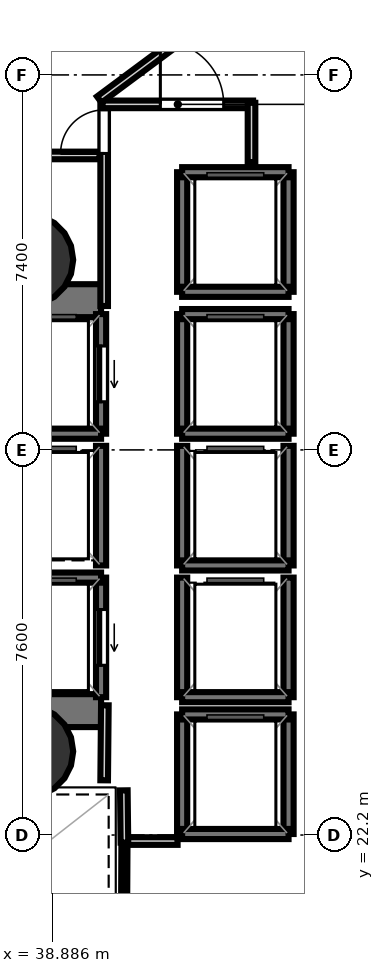
"""IFC4 building model, lengths in metres.
Left out: names, types, materials, properties, quantities, classifications, styles, units other than length and angle.
Written with IfcOpenShell. Run it as: python <this file> out.ifc"""

import sys

from ifc_helpers import new_model, si_unit, direction, frame, frame_2d, origin, origin_2d, place, context, subcontext, project, spatial, rectangle, hollow_circle, extrude, element, fill, save


model = new_model("IFC4")
c1 = context("Model", 3, precision=1e-05, world=origin(), true_north=direction((0.0, 1.0)))
c2 = subcontext(c1, "Body", "Model", "MODEL_VIEW")
j1 = project(units=[si_unit("LENGTHUNIT", "METRE"), si_unit("PLANEANGLEUNIT", "RADIAN")], contexts=[c1])
p1 = place(None, origin())
s1 = spatial("IfcSite", under=j1, at=p1, CompositionType="ELEMENT")
p2 = place(p1, origin())
s2 = spatial("IfcBuilding", under=s1, at=p2, CompositionType="ELEMENT")
p3 = place(p2, frame((0.0, 0.0, 40.5)))
s3 = spatial("IfcBuildingStorey", under=s2, at=p3, CompositionType="ELEMENT", Elevation=40.5)
p4 = place(p3, frame((29.13, 32.745, 0.0), z_axis=(0.0, 0.0, 1.0), x_axis=(1.0, 0.0, 0.0)))
e1 = element("IfcWall", 1, at=p4, inside=s3, PredefinedType="SHEAR", context=c2, shape_type="SweptSolid", body=[
    extrude(rectangle(XDim=10.72, YDim=0.65, at=frame_2d((5.36, 0.0))), origin(), (0.0, 0.0, 1.0), 3.52),
])
p5 = place(p4, frame((1.095, 0.0, 0.0)))
e2 = element("IfcOpeningElement", 2, at=p5, cuts=e1, PredefinedType="OPENING", context=c2, shape_type="SweptSolid", body=[
    extrude(rectangle(XDim=1.25, YDim=2.15, at=frame_2d((0.625, 1.075))), frame((0.0, 0.335, 0.0), z_axis=(0.0, -1.0, 0.0), x_axis=(1.0, 0.0, 0.0)), (0.0, 0.0, 1.0), 0.67),
])
p6 = place(p3, frame((29.13, 24.655, 0.0), z_axis=(0.0, 0.0, 1.0), x_axis=(1.0, 0.0, 0.0)))
e3 = element("IfcWall", 3, at=p6, inside=s3, PredefinedType="SHEAR", context=c2, shape_type="SweptSolid", body=[
    extrude(rectangle(XDim=10.72, YDim=0.65, at=frame_2d((5.36, 0.0))), origin(), (0.0, 0.0, 1.0), 3.52),
])
p7 = place(p6, frame((0.895, 0.0, 0.0)))
e4 = element("IfcOpeningElement", 4, at=p7, cuts=e3, PredefinedType="OPENING", context=c2, shape_type="SweptSolid", body=[
    extrude(rectangle(XDim=1.25, YDim=2.15, at=frame_2d((0.625, 1.075))), frame((0.0, 0.335, 0.0), z_axis=(0.0, -1.0, 0.0), x_axis=(1.0, 0.0, 0.0)), (0.0, 0.0, 1.0), 0.67),
])
for number, where, z_axis, x_axis in (
    (5, (38.4, 33.55, 0.0), (0.0, 0.0, 1.0), (1.0, 0.0, 0.0)),
    (6, (38.4, 23.85, 0.0), (0.0, 0.0, 1.0), (1.0, 0.0, 0.0)),
):
    element("IfcColumn", number, at=place(p3, frame(where, z_axis=z_axis, x_axis=x_axis)), inside=s3, PredefinedType="COLUMN", context=c2, shape_type="SweptSolid", body=[
        extrude(hollow_circle(Radius=0.9, WallThickness=0.045, at=origin_2d()), origin(), (0.0, 0.0, 1.0), 3.7),
    ])
p8 = place(p3, frame((39.85, 30.12, 0.0), z_axis=(0.0, 0.0, 1.0), x_axis=(0.0, 1.0, 0.0)))
e7 = element("IfcWall", 7, at=p8, inside=s3, PredefinedType="SOLIDWALL", context=c2, shape_type="SweptSolid", body=[
    extrude(rectangle(XDim=2.36, YDim=0.2, at=frame_2d((1.18, 0.0))), origin(), (0.0, 0.0, 1.0), 3.52),
])
p9 = place(p8, frame((0.63, 0.0, 0.0)))
e8 = element("IfcOpeningElement", 8, at=p9, cuts=e7, PredefinedType="OPENING", context=c2, shape_type="SweptSolid", body=[
    extrude(rectangle(XDim=1.1, YDim=2.15, at=frame_2d((0.55, 1.075))), frame((0.0, 0.11, 0.0), z_axis=(0.0, -1.0, 0.0), x_axis=(1.0, 0.0, 0.0)), (0.0, 0.0, 1.0), 0.22),
])
p10 = place(p3, frame((37.75, 30.12, 0.0), z_axis=(0.0, 0.0, 1.0), x_axis=(1.0, 0.0, 0.0)))
e9 = element("IfcWall", 9, at=p10, inside=s3, PredefinedType="SOLIDWALL", context=c2, shape_type="SweptSolid", body=[
    extrude(rectangle(XDim=2.1, YDim=0.2, at=frame_2d((1.05, 0.0))), origin(), (0.0, 0.0, 1.0), 3.52),
])
p11 = place(p3, frame((39.85, 24.92, 0.0), z_axis=(0.0, 0.0, 1.0), x_axis=(0.0, 1.0, 0.0)))
e10 = element("IfcWall", 10, at=p11, inside=s3, PredefinedType="SOLIDWALL", context=c2, shape_type="SweptSolid", body=[
    extrude(rectangle(XDim=2.36, YDim=0.2, at=frame_2d((1.18, 0.0))), origin(), (0.0, 0.0, 1.0), 3.52),
])
p12 = place(p11, frame((0.63, 0.0, 0.0)))
e11 = element("IfcOpeningElement", 11, at=p12, cuts=e10, PredefinedType="OPENING", context=c2, shape_type="SweptSolid", body=[
    extrude(rectangle(XDim=1.1, YDim=2.15, at=frame_2d((0.55, 1.075))), frame((0.0, 0.11, 0.0), z_axis=(0.0, -1.0, 0.0), x_axis=(1.0, 0.0, 0.0)), (0.0, 0.0, 1.0), 0.22),
])
p13 = place(p3, frame((37.75, 27.28, 0.0), z_axis=(0.0, 0.0, 1.0), x_axis=(1.0, 0.0, 0.0)))
e12 = element("IfcWall", 12, at=p13, inside=s3, PredefinedType="SOLIDWALL", context=c2, shape_type="SweptSolid", body=[
    extrude(rectangle(XDim=2.1, YDim=0.2, at=frame_2d((1.05, 0.0))), origin(), (0.0, 0.0, 1.0), 3.52),
])
for number, where, z_axis, x_axis in (
    (13, (43.55, 30.12, 0.0), (0.0, 0.0, 1.0), (0.0, 1.0, 0.0)),
    (14, (41.45, 30.12, 0.0), (0.0, 0.0, 1.0), (0.0, 1.0, 0.0)),
):
    element("IfcWall", number, at=place(p3, frame(where, z_axis=z_axis, x_axis=x_axis)), inside=s3, PredefinedType="SOLIDWALL", context=c2, shape_type="SweptSolid", body=[
        extrude(rectangle(XDim=2.36, YDim=0.2, at=frame_2d((1.18, 0.0))), origin(), (0.0, 0.0, 1.0), 3.52),
    ])
for number, where, z_axis, x_axis in (
    (15, (41.45, 32.48, 0.0), (0.0, 0.0, 1.0), (1.0, 0.0, 0.0)),
    (16, (41.45, 30.12, 0.0), (0.0, 0.0, 1.0), (1.0, 0.0, 0.0)),
):
    element("IfcWall", number, at=place(p3, frame(where, z_axis=z_axis, x_axis=x_axis)), inside=s3, PredefinedType="SOLIDWALL", context=c2, shape_type="SweptSolid", body=[
        extrude(rectangle(XDim=2.1, YDim=0.2, at=frame_2d((1.05, 0.0))), origin(), (0.0, 0.0, 1.0), 3.52),
    ])
for number, where, z_axis, x_axis in (
    (17, (43.55, 27.52, 0.0), (0.0, 0.0, 1.0), (0.0, 1.0, 0.0)),
    (18, (41.45, 27.52, 0.0), (0.0, 0.0, 1.0), (0.0, 1.0, 0.0)),
):
    element("IfcWall", number, at=place(p3, frame(where, z_axis=z_axis, x_axis=x_axis)), inside=s3, PredefinedType="SOLIDWALL", context=c2, shape_type="SweptSolid", body=[
        extrude(rectangle(XDim=2.36, YDim=0.2, at=frame_2d((1.18, 0.0))), origin(), (0.0, 0.0, 1.0), 3.52),
    ])
p14 = place(p3, frame((41.45, 27.52, 0.0), z_axis=(0.0, 0.0, 1.0), x_axis=(1.0, 0.0, 0.0)))
e19 = element("IfcWall", 19, at=p14, inside=s3, PredefinedType="SOLIDWALL", context=c2, shape_type="SweptSolid", body=[
    extrude(rectangle(XDim=2.1, YDim=0.2, at=frame_2d((1.05, 0.0))), origin(), (0.0, 0.0, 1.0), 3.52),
])
for number, where, z_axis, x_axis in (
    (20, (43.55, 24.92, 0.0), (0.0, 0.0, 1.0), (0.0, 1.0, 0.0)),
    (21, (41.45, 24.92, 0.0), (0.0, 0.0, 1.0), (0.0, 1.0, 0.0)),
):
    element("IfcWall", number, at=place(p3, frame(where, z_axis=z_axis, x_axis=x_axis)), inside=s3, PredefinedType="SOLIDWALL", context=c2, shape_type="SweptSolid", body=[
        extrude(rectangle(XDim=2.36, YDim=0.2, at=frame_2d((1.18, 0.0))), origin(), (0.0, 0.0, 1.0), 3.52),
    ])
p15 = place(p3, frame((41.45, 24.92, 0.0), z_axis=(0.0, 0.0, 1.0), x_axis=(1.0, 0.0, 0.0)))
e22 = element("IfcWall", 22, at=p15, inside=s3, PredefinedType="SOLIDWALL", context=c2, shape_type="SweptSolid", body=[
    extrude(rectangle(XDim=2.1, YDim=0.2, at=frame_2d((1.05, 0.0))), origin(), (0.0, 0.0, 1.0), 3.52),
])
p16 = place(p3, frame((39.85, 27.52, 0.0), z_axis=(0.0, 0.0, 1.0), x_axis=(0.0, 1.0, 0.0)))
e23 = element("IfcWall", 23, at=p16, inside=s3, PredefinedType="SOLIDWALL", context=c2, shape_type="SweptSolid", body=[
    extrude(rectangle(XDim=2.36, YDim=0.2, at=frame_2d((1.18, 0.0))), origin(), (0.0, 0.0, 1.0), 3.52),
])
for number, where, z_axis, x_axis in (
    (24, (43.55, 22.22, 0.0), (0.0, 0.0, 1.0), (0.0, 1.0, 0.0)),
    (25, (41.45, 22.22, 0.0), (0.0, 0.0, 1.0), (0.0, 1.0, 0.0)),
):
    element("IfcWall", number, at=place(p3, frame(where, z_axis=z_axis, x_axis=x_axis)), inside=s3, PredefinedType="SOLIDWALL", context=c2, shape_type="SweptSolid", body=[
        extrude(rectangle(XDim=2.36, YDim=0.2, at=frame_2d((1.18, 0.0))), origin(), (0.0, 0.0, 1.0), 3.52),
    ])
for number, where, z_axis, x_axis in (
    (26, (41.45, 24.58, 0.0), (0.0, 0.0, 1.0), (1.0, 0.0, 0.0)),
    (27, (41.45, 22.22, 0.0), (0.0, 0.0, 1.0), (1.0, 0.0, 0.0)),
):
    element("IfcWall", number, at=place(p3, frame(where, z_axis=z_axis, x_axis=x_axis)), inside=s3, PredefinedType="SOLIDWALL", context=c2, shape_type="SweptSolid", body=[
        extrude(rectangle(XDim=2.1, YDim=0.2, at=frame_2d((1.05, 0.0))), origin(), (0.0, 0.0, 1.0), 3.52),
    ])
for number, where, z_axis, x_axis in (
    (28, (43.55, 32.92, 0.0), (0.0, 0.0, 1.0), (0.0, 1.0, 0.0)),
    (29, (41.45, 32.92, 0.0), (0.0, 0.0, 1.0), (0.0, 1.0, 0.0)),
):
    element("IfcWall", number, at=place(p3, frame(where, z_axis=z_axis, x_axis=x_axis)), inside=s3, PredefinedType="SOLIDWALL", context=c2, shape_type="SweptSolid", body=[
        extrude(rectangle(XDim=2.36, YDim=0.2, at=frame_2d((1.18, 0.0))), origin(), (0.0, 0.0, 1.0), 3.52),
    ])
for number, where, z_axis, x_axis in (
    (30, (41.45, 35.28, 0.0), (0.0, 0.0, 1.0), (1.0, 0.0, 0.0)),
    (31, (41.45, 32.92, 0.0), (0.0, 0.0, 1.0), (1.0, 0.0, 0.0)),
):
    element("IfcWall", number, at=place(p3, frame(where, z_axis=z_axis, x_axis=x_axis)), inside=s3, PredefinedType="SOLIDWALL", context=c2, shape_type="SweptSolid", body=[
        extrude(rectangle(XDim=2.1, YDim=0.2, at=frame_2d((1.05, 0.0))), origin(), (0.0, 0.0, 1.0), 3.52),
    ])
p17 = place(p3, frame((39.911, 32.64, 0.0), z_axis=(0.0, 0.0, 1.0), x_axis=(0.0, 1.0, 0.0)))
e32 = element("IfcWall", 32, at=p17, inside=s3, PredefinedType="PARTITIONING", context=c2, shape_type="SweptSolid", body=[
    extrude(rectangle(XDim=4.01, YDim=0.15, at=frame_2d((2.005, 0.0))), origin(), (0.0, 0.0, 1.0), 2.84),
])
p18 = place(p17, frame((3.01, 0.0, 0.0)))
e33 = element("IfcOpeningElement", 33, at=p18, cuts=e32, PredefinedType="OPENING", context=c2, shape_type="SweptSolid", body=[
    extrude(rectangle(XDim=0.86, YDim=2.05, at=frame_2d((0.43, 1.025))), frame((0.0, 0.085, 0.0), z_axis=(0.0, -1.0, 0.0), x_axis=(1.0, 0.0, 0.0)), (0.0, 0.0, 1.0), 0.17),
])
p19 = place(p3, frame((39.88, 36.619, 0.0), z_axis=(0.0, 0.0, 1.0), x_axis=(1.0, 0.0, 0.0)))
e34 = element("IfcWall", 34, at=p19, inside=s3, PredefinedType="PARTITIONING", context=c2, shape_type="SweptSolid", body=[
    extrude(rectangle(XDim=2.97, YDim=0.15, at=frame_2d((1.485, 0.0))), origin(), (0.0, 0.0, 1.0), 2.84),
])
p20 = place(p19, frame((1.14, 0.0, 0.0)))
e35 = element("IfcOpeningElement", 35, at=p20, cuts=e34, PredefinedType="OPENING", context=c2, shape_type="SweptSolid", body=[
    extrude(rectangle(XDim=1.25, YDim=2.2, at=frame_2d((0.625, 1.1))), frame((0.0, 0.085, 0.0), z_axis=(0.0, -1.0, 0.0), x_axis=(1.0, 0.0, 0.0)), (0.0, 0.0, 1.0), 0.17),
])
p21 = place(p3, frame((42.819, 36.65, 0.0), z_axis=(0.0, 0.0, 1.0), x_axis=(0.0, -1.0, 0.0)))
e36 = element("IfcWall", 36, at=p21, inside=s3, PredefinedType="PARTITIONING", context=c2, shape_type="SweptSolid", body=[
    extrude(rectangle(XDim=1.17, YDim=0.15, at=frame_2d((0.585, 0.0))), origin(), (0.0, 0.0, 1.0), 2.84),
])
p22 = place(p3, frame((41.36, 22.081, 0.0), z_axis=(0.0, 0.0, 1.0), x_axis=(-1.0, 0.0, 0.0)))
e37 = element("IfcWall", 37, at=p22, inside=s3, PredefinedType="PARTITIONING", context=c2, shape_type="SweptSolid", body=[
    extrude(rectangle(XDim=1.08, YDim=0.15, at=frame_2d((0.54, 0.0))), origin(), (0.0, 0.0, 1.0), 2.84),
])
p23 = place(p3, frame((40.311, 22.05, 0.0), z_axis=(0.0, 0.0, 1.0), x_axis=(-0.011836292006, 0.999929948642, 0.0)))
e38 = element("IfcWall", 38, at=p23, inside=s3, PredefinedType="PARTITIONING", context=c2, shape_type="SweptSolid", body=[
    extrude(rectangle(XDim=1.031, YDim=0.15, at=frame_2d((0.516, 0.0))), origin(), (0.0, 0.0, 1.0), 2.84),
])
p24 = place(p3, frame((39.911, 23.28, 0.0), z_axis=(0.0, 0.0, 1.0), x_axis=(0.009397771291, 0.999955839972, 0.0)))
e39 = element("IfcWall", 39, at=p24, inside=s3, PredefinedType="PARTITIONING", context=c2, shape_type="SweptSolid", body=[
    extrude(rectangle(XDim=1.481, YDim=0.15, at=frame_2d((0.74, 0.0))), origin(), (0.0, 0.0, 1.0), 2.84),
])
p25 = place(p3, frame((42.185, 38.475, 0.0), z_axis=(0.0, 0.0, 1.0), x_axis=(-0.802818467394, -0.596223538961, 0.0)))
e40 = element("IfcWall", 40, at=p25, inside=s3, PredefinedType="PARTITIONING", context=c2, shape_type="SweptSolid", body=[
    extrude(rectangle(XDim=2.953, YDim=0.15, at=frame_2d((1.477, 0.0))), origin(), (0.0, 0.0, 1.0), 2.798),
])
p26 = place(p3, frame((39.818, 35.611, 0.0), z_axis=(0.0, 0.0, 1.0), x_axis=(-1.0, 0.0, 0.0)))
e41 = element("IfcWall", 41, at=p26, inside=s3, PredefinedType="PARTITIONING", context=c2, shape_type="SweptSolid", body=[
    extrude(rectangle(XDim=2.768, YDim=0.15, at=frame_2d((1.384, 0.0))), origin(), (0.0, 0.0, 1.0), 2.84),
])
p27 = place(p3, frame((38.282, 44.518, 0.0), z_axis=(0.0, 0.0, 1.0), x_axis=(0.66245043497, -0.74910574768, 0.0)))
e42 = element("IfcWall", 42, at=p27, inside=s3, PredefinedType="PARTITIONING", context=c2, shape_type="SweptSolid", body=[
    extrude(rectangle(XDim=31.025, YDim=0.105, at=frame_2d((15.512, 0.0))), origin(), (0.0, 0.0, 1.0), 2.798),
])
p28 = place(p3, frame((40.29, 17.893, 0.0), z_axis=(0.0, 0.0, 1.0), x_axis=(0.005209510146, 0.99998643041, 0.0)))
e43 = element("IfcWall", 43, at=p28, inside=s3, PredefinedType="PARTITIONING", context=c2, shape_type="SweptSolid", body=[
    extrude(rectangle(XDim=4.077, YDim=0.12, at=frame_2d((2.039, 0.0))), origin(), (0.0, 0.0, 1.0), 2.84),
])
p29 = place(p9, origin())
e44 = element("IfcDoor", 44, at=p29, inside=s3, OperationType="SLIDING_TO_LEFT", PredefinedType="DOOR", context=c2, shape_type="SweptSolid", body=[
    extrude(rectangle(XDim=1.1, YDim=2.15, at=frame_2d((0.55, 1.075))), frame((0.0, 0.025, 0.0), z_axis=(0.0, -1.0, 0.0), x_axis=(1.0, 0.0, 0.0)), (0.0, 0.0, 1.0), 0.05),
])
fill(e8, e44)
p30 = place(p12, origin())
e45 = element("IfcDoor", 45, at=p30, inside=s3, OperationType="SLIDING_TO_LEFT", PredefinedType="DOOR", context=c2, shape_type="SweptSolid", body=[
    extrude(rectangle(XDim=1.1, YDim=2.15, at=frame_2d((0.55, 1.075))), frame((0.0, 0.025, 0.0), z_axis=(0.0, -1.0, 0.0), x_axis=(1.0, 0.0, 0.0)), (0.0, 0.0, 1.0), 0.05),
])
fill(e11, e45)
p31 = place(p18, origin())
e46 = element("IfcDoor", 46, at=p31, inside=s3, OperationType="SINGLE_SWING_LEFT", PredefinedType="DOOR", context=c2, shape_type="SweptSolid", body=[
    extrude(rectangle(XDim=0.86, YDim=2.05, at=frame_2d((0.43, 1.025))), frame((0.0, 0.025, 0.0), z_axis=(0.0, -1.0, 0.0), x_axis=(1.0, 0.0, 0.0)), (0.0, 0.0, 1.0), 0.05),
])
fill(e33, e46)
p32 = place(p20, origin())
e47 = element("IfcDoor", 47, at=p32, inside=s3, OperationType="SINGLE_SWING_LEFT", PredefinedType="DOOR", context=c2, shape_type="SweptSolid", body=[
    extrude(rectangle(XDim=1.25, YDim=2.2, at=frame_2d((0.625, 1.1))), frame((0.0, 0.025, 0.0), z_axis=(0.0, -1.0, 0.0), x_axis=(1.0, 0.0, 0.0)), (0.0, 0.0, 1.0), 0.05),
])
fill(e35, e47)
save(model, sys.argv[1])
